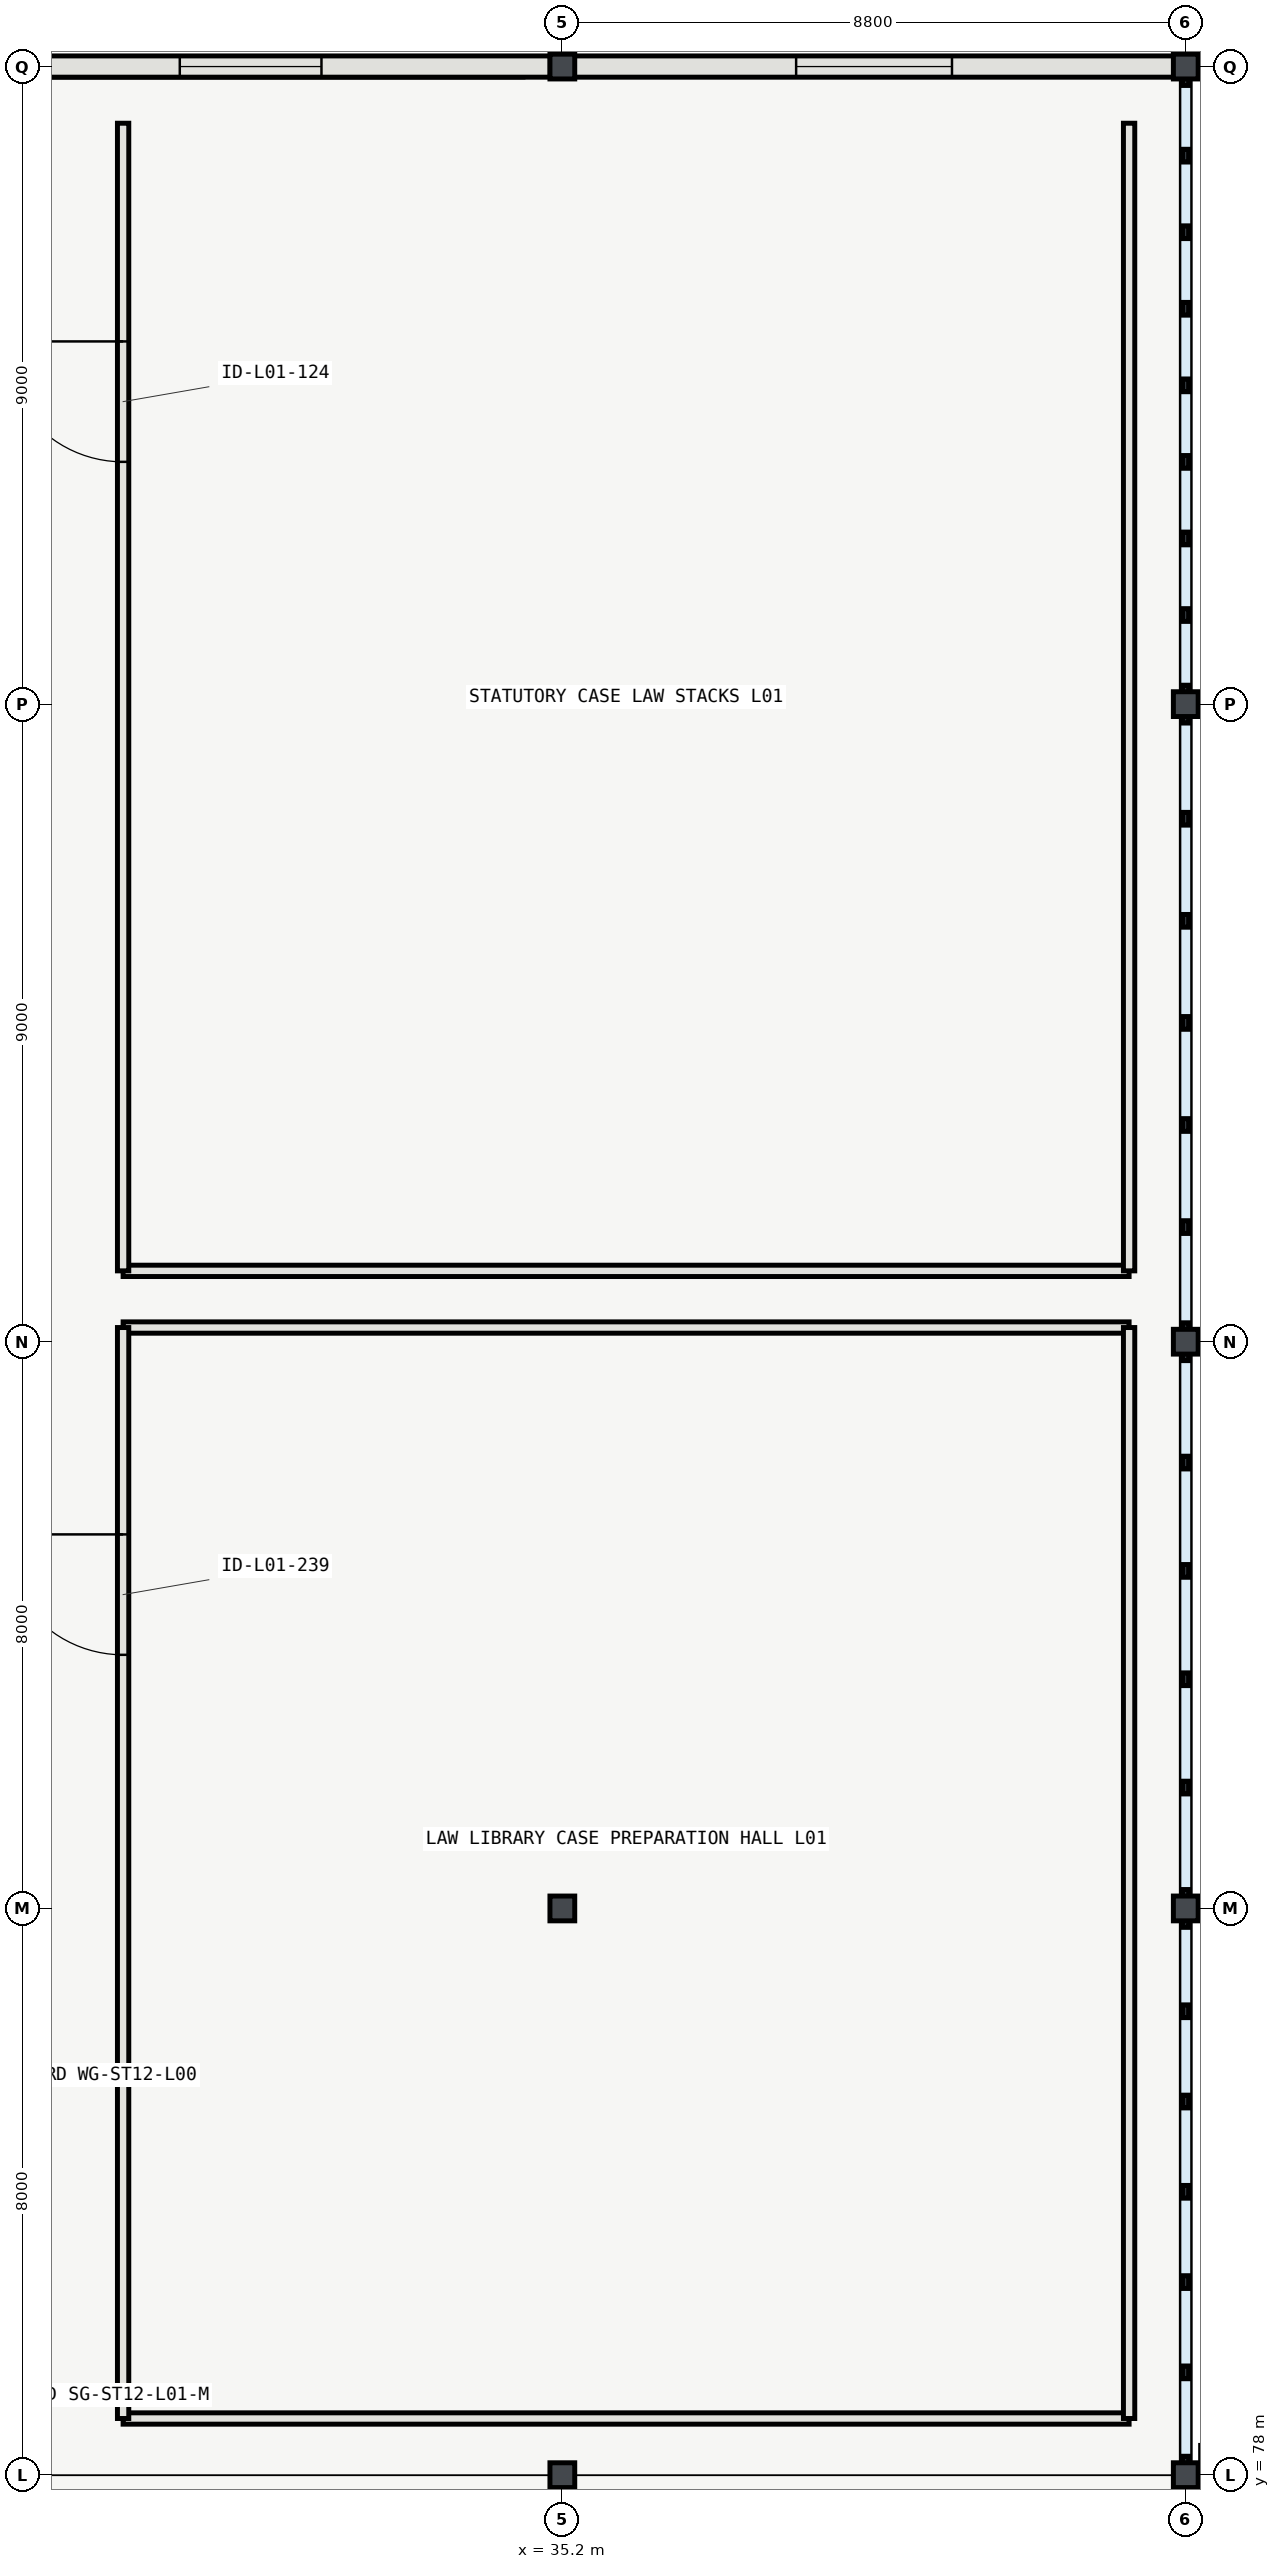
"""IFC4 building model, lengths in metres.
Left out: names, types, materials, properties, quantities, classifications, styles, units other than length and angle.
Written with IfcOpenShell. Run it as: python <this file> out.ifc"""

import sys

from ifc_helpers import new_model, si_unit, direction, frame, frame_2d, origin, origin_2d, place, context, subcontext, project, spatial, rectangle, i_section, extrude, element, fill, save


model = new_model("IFC4")
c1 = context("Model", 3, precision=1e-05, world=origin(), true_north=direction((0.0, 1.0)))
c2 = subcontext(c1, "Body", "Model", "MODEL_VIEW")
j1 = project(units=[si_unit("LENGTHUNIT", "METRE"), si_unit("PLANEANGLEUNIT", "RADIAN")], contexts=[c1])
p1 = place(None, origin())
s1 = spatial("IfcSite", under=j1, at=p1, CompositionType="ELEMENT")
p2 = place(p1, origin())
s2 = spatial("IfcBuilding", under=s1, at=p2, CompositionType="ELEMENT")
p3 = place(p2, frame((0.0, 0.0, 5.4)))
s3 = spatial("IfcBuildingStorey", under=s2, at=p3, CompositionType="ELEMENT", Elevation=5.4)
for number, where, z_axis, x_axis in (
    (1, (35.2, 78.0, 0.0), (0.0, 0.0, 1.0), (1.0, 0.0, 0.0)),
    (2, (35.2, 86.0, 0.0), (0.0, 0.0, 1.0), (1.0, 0.0, 0.0)),
    (3, (35.2, 112.0, 0.0), (0.0, 0.0, 1.0), (1.0, 0.0, 0.0)),
    (4, (44.0, 78.0, 0.0), (0.0, 0.0, 1.0), (1.0, 0.0, 0.0)),
    (5, (44.0, 86.0, 0.0), (0.0, 0.0, 1.0), (1.0, 0.0, 0.0)),
    (6, (44.0, 94.0, 0.0), (0.0, 0.0, 1.0), (1.0, 0.0, 0.0)),
    (7, (44.0, 103.0, 0.0), (0.0, 0.0, 1.0), (1.0, 0.0, 0.0)),
    (8, (44.0, 112.0, 0.0), (0.0, 0.0, 1.0), (1.0, 0.0, 0.0)),
):
    element("IfcColumn", number, at=place(p3, frame(where, z_axis=z_axis, x_axis=x_axis)), inside=s3, PredefinedType="COLUMN", context=c2, shape_type="SweptSolid", body=[
        extrude(i_section(OverallWidth=0.35, OverallDepth=0.35, WebThickness=0.012, FlangeThickness=0.019, FilletRadius=0.02, at=origin_2d()), origin(), (0.0, 0.0, 1.0), 5.4),
    ])
p4 = place(p3, frame((35.029, 112.0, 0.0), z_axis=(0.0, 0.0, 1.0), x_axis=(-1.0, 0.0, 0.0)))
e9 = element("IfcWall", 9, at=p4, inside=s3, PredefinedType="SOLIDWALL", context=c2, shape_type="SweptSolid", body=[
    extrude(rectangle(XDim=8.458, YDim=0.3, at=frame_2d((4.229, 0.0))), origin(), (0.0, 0.0, 1.0), 4.803),
])
p5 = place(p4, frame((3.229, 0.0, 0.95)))
e10 = element("IfcOpeningElement", 10, at=p5, cuts=e9, PredefinedType="OPENING", context=c2, shape_type="SweptSolid", body=[
    extrude(rectangle(XDim=2.0, YDim=1.8, at=frame_2d((1.0, 0.9))), frame((0.0, 0.16, 0.0), z_axis=(0.0, -1.0, 0.0), x_axis=(1.0, 0.0, 0.0)), (0.0, 0.0, 1.0), 0.32),
])
p6 = place(p3, frame((43.829, 112.0, 0.0), z_axis=(0.0, 0.0, 1.0), x_axis=(-1.0, 0.0, 0.0)))
e11 = element("IfcWall", 11, at=p6, inside=s3, PredefinedType="SOLIDWALL", context=c2, shape_type="SweptSolid", body=[
    extrude(rectangle(XDim=8.458, YDim=0.3, at=frame_2d((4.229, 0.0))), origin(), (0.0, 0.0, 1.0), 4.803),
])
p7 = place(p6, frame((3.129, 0.0, 0.95)))
e12 = element("IfcOpeningElement", 12, at=p7, cuts=e11, PredefinedType="OPENING", context=c2, shape_type="SweptSolid", body=[
    extrude(rectangle(XDim=2.2, YDim=1.8, at=frame_2d((1.1, 0.9))), frame((0.0, 0.16, 0.0), z_axis=(0.0, -1.0, 0.0), x_axis=(1.0, 0.0, 0.0)), (0.0, 0.0, 1.0), 0.32),
])
p8 = place(p3, frame((29.0, 95.0, 0.0), z_axis=(0.0, 0.0, 1.0), x_axis=(1.0, 0.0, 0.0)))
e13 = element("IfcWall", 13, at=p8, inside=s3, PredefinedType="PARTITIONING", context=c2, shape_type="SweptSolid", body=[
    extrude(rectangle(XDim=14.2, YDim=0.16, at=frame_2d((7.1, 0.0))), origin(), (0.0, 0.0, 1.0), 5.12),
])
p9 = place(p3, frame((29.0, 111.2, 0.0), z_axis=(0.0, 0.0, 1.0), x_axis=(0.0, -1.0, 0.0)))
e14 = element("IfcWall", 14, at=p9, inside=s3, PredefinedType="PARTITIONING", context=c2, shape_type="SweptSolid", body=[
    extrude(rectangle(XDim=16.2, YDim=0.16, at=frame_2d((8.1, 0.0))), origin(), (0.0, 0.0, 1.0), 5.12),
])
p10 = place(p9, frame((3.08, 0.0, 0.0)))
e15 = element("IfcOpeningElement", 15, at=p10, cuts=e14, PredefinedType="OPENING", context=c2, shape_type="SweptSolid", body=[
    extrude(rectangle(XDim=1.7, YDim=2.3, at=frame_2d((0.85, 1.15))), frame((0.0, 0.09, 0.0), z_axis=(0.0, -1.0, 0.0), x_axis=(1.0, 0.0, 0.0)), (0.0, 0.0, 1.0), 0.18),
])
p11 = place(p3, frame((43.2, 95.0, 0.0), z_axis=(0.0, 0.0, 1.0), x_axis=(0.0, 1.0, 0.0)))
e16 = element("IfcWall", 16, at=p11, inside=s3, PredefinedType="PARTITIONING", context=c2, shape_type="SweptSolid", body=[
    extrude(rectangle(XDim=16.2, YDim=0.16, at=frame_2d((8.1, 0.0))), origin(), (0.0, 0.0, 1.0), 5.12),
])
p12 = place(p3, frame((29.0, 78.8, 0.0), z_axis=(0.0, 0.0, 1.0), x_axis=(1.0, 0.0, 0.0)))
e17 = element("IfcWall", 17, at=p12, inside=s3, PredefinedType="PARTITIONING", context=c2, shape_type="SweptSolid", body=[
    extrude(rectangle(XDim=14.2, YDim=0.16, at=frame_2d((7.1, 0.0))), origin(), (0.0, 0.0, 1.0), 5.12),
])
p13 = place(p3, frame((43.2, 94.2, 0.0), z_axis=(0.0, 0.0, 1.0), x_axis=(-1.0, 0.0, 0.0)))
e18 = element("IfcWall", 18, at=p13, inside=s3, PredefinedType="PARTITIONING", context=c2, shape_type="SweptSolid", body=[
    extrude(rectangle(XDim=14.2, YDim=0.16, at=frame_2d((7.1, 0.0))), origin(), (0.0, 0.0, 1.0), 4.406),
])
p14 = place(p3, frame((29.0, 94.2, 0.0), z_axis=(0.0, 0.0, 1.0), x_axis=(0.0, -1.0, 0.0)))
e19 = element("IfcWall", 19, at=p14, inside=s3, PredefinedType="PARTITIONING", context=c2, shape_type="SweptSolid", body=[
    extrude(rectangle(XDim=15.4, YDim=0.16, at=frame_2d((7.7, 0.0))), origin(), (0.0, 0.0, 1.0), 5.12),
])
p15 = place(p14, frame((2.92, 0.0, 0.0)))
e20 = element("IfcOpeningElement", 20, at=p15, cuts=e19, PredefinedType="OPENING", context=c2, shape_type="SweptSolid", body=[
    extrude(rectangle(XDim=1.7, YDim=2.3, at=frame_2d((0.85, 1.15))), frame((0.0, 0.09, 0.0), z_axis=(0.0, -1.0, 0.0), x_axis=(1.0, 0.0, 0.0)), (0.0, 0.0, 1.0), 0.18),
])
p16 = place(p3, frame((43.2, 78.8, 0.0), z_axis=(0.0, 0.0, 1.0), x_axis=(0.0, 1.0, 0.0)))
e21 = element("IfcWall", 21, at=p16, inside=s3, PredefinedType="PARTITIONING", context=c2, shape_type="SweptSolid", body=[
    extrude(rectangle(XDim=15.4, YDim=0.16, at=frame_2d((7.7, 0.0))), origin(), (0.0, 0.0, 1.0), 5.12),
])
p17 = place(p5, origin())
e22 = element("IfcWindow", 22, at=p17, inside=s3, PartitioningType="SINGLE_PANEL", PredefinedType="WINDOW", context=c2, shape_type="SweptSolid", body=[
    extrude(rectangle(XDim=2.0, YDim=1.8, at=frame_2d((1.0, 0.9))), frame((0.0, 0.03, 0.0), z_axis=(0.0, -1.0, 0.0), x_axis=(1.0, 0.0, 0.0)), (0.0, 0.0, 1.0), 0.06),
])
fill(e10, e22)
p18 = place(p7, origin())
e23 = element("IfcWindow", 23, at=p18, inside=s3, PartitioningType="SINGLE_PANEL", PredefinedType="WINDOW", context=c2, shape_type="SweptSolid", body=[
    extrude(rectangle(XDim=2.2, YDim=1.8, at=frame_2d((1.1, 0.9))), frame((0.0, 0.03, 0.0), z_axis=(0.0, -1.0, 0.0), x_axis=(1.0, 0.0, 0.0)), (0.0, 0.0, 1.0), 0.06),
])
fill(e12, e23)
p19 = place(p10, origin())
e24 = element("IfcDoor", 24, at=p19, inside=s3, OperationType="DOUBLE_DOOR_SINGLE_SWING", PredefinedType="DOOR", context=c2, shape_type="SweptSolid", body=[
    extrude(rectangle(XDim=1.7, YDim=2.3, at=frame_2d((0.85, 1.15))), frame((0.0, 0.025, 0.0), z_axis=(0.0, -1.0, 0.0), x_axis=(1.0, 0.0, 0.0)), (0.0, 0.0, 1.0), 0.05),
])
fill(e15, e24)
p20 = place(p15, origin())
e25 = element("IfcDoor", 25, at=p20, inside=s3, OperationType="DOUBLE_DOOR_SINGLE_SWING", PredefinedType="DOOR", context=c2, shape_type="SweptSolid", body=[
    extrude(rectangle(XDim=1.7, YDim=2.3, at=frame_2d((0.85, 1.15))), frame((0.0, 0.025, 0.0), z_axis=(0.0, -1.0, 0.0), x_axis=(1.0, 0.0, 0.0)), (0.0, 0.0, 1.0), 0.05),
])
fill(e20, e25)
save(model, sys.argv[1])
